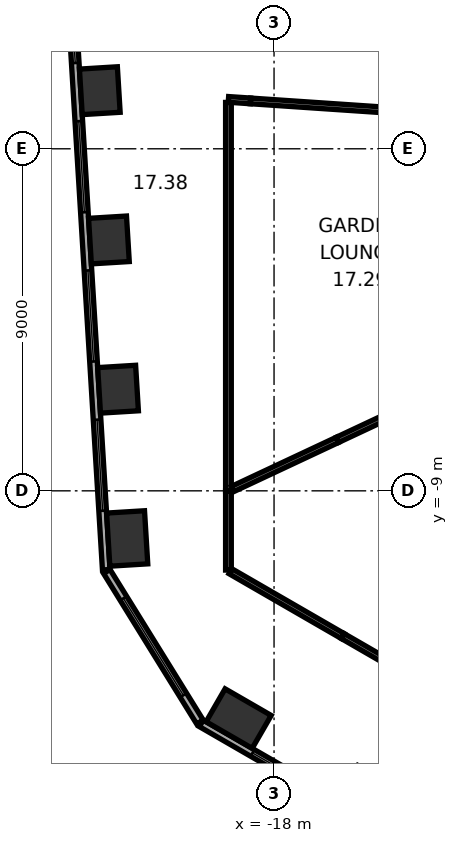
"""IFC4 building model, lengths in metres.
Left out: names, types, materials, properties, quantities, classifications, styles, units other than length and angle.
Written with IfcOpenShell. Run it as: python <this file> out.ifc"""

import sys

from ifc_helpers import new_model, si_unit, direction, frame, frame_2d, origin, origin_2d, place, context, subcontext, project, spatial, rectangle, extrude, element, fill, save


model = new_model("IFC4")
c1 = context("Model", 3, precision=1e-05, world=origin(), true_north=direction((0.0, 1.0)))
c2 = subcontext(c1, "Body", "Model", "MODEL_VIEW")
j1 = project(units=[si_unit("LENGTHUNIT", "METRE"), si_unit("PLANEANGLEUNIT", "RADIAN")], contexts=[c1])
p1 = place(None, origin())
s1 = spatial("IfcSite", under=j1, at=p1, CompositionType="ELEMENT")
p2 = place(p1, origin())
s2 = spatial("IfcBuilding", under=s1, at=p2, CompositionType="ELEMENT")
p3 = place(p2, frame((0.0, 0.0, 77.0)))
s3 = spatial("IfcBuildingStorey", under=s2, at=p3, CompositionType="ELEMENT", Elevation=77.0)
for number, where, z_axis, x_axis in (
    (1, (-22.585, 1.529, 0.0), (0.0, 0.0, 1.0), (0.061, -0.998, 0.0)),
    (2, (-22.345, -2.399, 0.0), (0.0, 0.0, 1.0), (0.061, -0.998, 0.0)),
    (3, (-22.105, -6.326, 0.0), (0.0, 0.0, 1.0), (0.061, -0.998, 0.0)),
):
    element("IfcColumn", number, at=place(p3, frame(where, z_axis=z_axis, x_axis=x_axis)), inside=s3, PredefinedType="COLUMN", context=c2, shape_type="SweptSolid", body=[
        extrude(rectangle(XDim=1.2, YDim=1.0, at=origin_2d()), origin(), (0.0, 0.0, 1.0), 6.6),
    ])
for number, where, z_axis, x_axis in (
    (4, (-21.865, -10.253, 0.0), (0.0, 0.0, 1.0), (0.061, -0.998, 0.0)),
    (5, (-18.932, -14.993, 0.0), (0.0, 0.0, 1.0), (0.866, -0.5, 0.0)),
):
    element("IfcColumn", number, at=place(p3, frame(where, z_axis=z_axis, x_axis=x_axis)), inside=s3, PredefinedType="COLUMN", context=c2, shape_type="SweptSolid", body=[
        extrude(rectangle(XDim=1.4, YDim=1.0, at=origin_2d()), origin(), (0.0, 0.0, 1.0), 6.6),
    ])
p4 = place(p3, frame((-23.713, 10.131, 0.0), z_axis=(0.0, 0.0, 1.0), x_axis=(0.061040439785, -0.998135293791, 0.0)))
e6 = element("IfcWall", 6, at=p4, inside=s3, PredefinedType="STANDARD", context=c2, shape_type="SweptSolid", body=[
    extrude(rectangle(XDim=21.246, YDim=0.2, at=frame_2d((10.623, 0.0))), origin(), (0.0, 0.0, 1.0), 6.6),
])
p5 = place(p4, frame((1.553, 0.0, 0.8)))
e7 = element("IfcOpeningElement", 7, at=p5, cuts=e6, PredefinedType="OPENING", context=c2, shape_type="SweptSolid", body=[
    extrude(rectangle(XDim=2.4, YDim=4.2, at=frame_2d((1.2, 2.1))), frame((0.0, 0.11, 0.0), z_axis=(0.0, -1.0, 0.0), x_axis=(1.0, 0.0, 0.0)), (0.0, 0.0, 1.0), 0.22),
])
p6 = place(p4, frame((5.488, 0.0, 0.8)))
e8 = element("IfcOpeningElement", 8, at=p6, cuts=e6, PredefinedType="OPENING", context=c2, shape_type="SweptSolid", body=[
    extrude(rectangle(XDim=2.4, YDim=4.2, at=frame_2d((1.2, 2.1))), frame((0.0, 0.11, 0.0), z_axis=(0.0, -1.0, 0.0), x_axis=(1.0, 0.0, 0.0)), (0.0, 0.0, 1.0), 0.22),
])
p7 = place(p4, frame((9.422, 0.0, 0.8)))
e9 = element("IfcOpeningElement", 9, at=p7, cuts=e6, PredefinedType="OPENING", context=c2, shape_type="SweptSolid", body=[
    extrude(rectangle(XDim=2.4, YDim=4.2, at=frame_2d((1.2, 2.1))), frame((0.0, 0.11, 0.0), z_axis=(0.0, -1.0, 0.0), x_axis=(1.0, 0.0, 0.0)), (0.0, 0.0, 1.0), 0.22),
])
p8 = place(p4, frame((13.357, 0.0, 0.8)))
e10 = element("IfcOpeningElement", 10, at=p8, cuts=e6, PredefinedType="OPENING", context=c2, shape_type="SweptSolid", body=[
    extrude(rectangle(XDim=2.4, YDim=4.2, at=frame_2d((1.2, 2.1))), frame((0.0, 0.11, 0.0), z_axis=(0.0, -1.0, 0.0), x_axis=(1.0, 0.0, 0.0)), (0.0, 0.0, 1.0), 0.22),
])
p9 = place(p4, frame((17.292, 0.0, 0.8)))
e11 = element("IfcOpeningElement", 11, at=p9, cuts=e6, PredefinedType="OPENING", context=c2, shape_type="SweptSolid", body=[
    extrude(rectangle(XDim=2.4, YDim=4.2, at=frame_2d((1.2, 2.1))), frame((0.0, 0.11, 0.0), z_axis=(0.0, -1.0, 0.0), x_axis=(1.0, 0.0, 0.0)), (0.0, 0.0, 1.0), 0.22),
])
p10 = place(p3, frame((-22.401, -11.122, 0.0), z_axis=(0.0, 0.0, 1.0), x_axis=(0.526197679914, -0.850362276711, 0.0)))
e12 = element("IfcWall", 12, at=p10, inside=s3, PredefinedType="STANDARD", context=c2, shape_type="SweptSolid", body=[
    extrude(rectangle(XDim=4.66, YDim=0.2, at=frame_2d((2.33, 0.0))), origin(), (0.0, 0.0, 1.0), 6.6),
])
p11 = place(p10, frame((0.83, 0.0, 0.8)))
e13 = element("IfcOpeningElement", 13, at=p11, cuts=e12, PredefinedType="OPENING", context=c2, shape_type="SweptSolid", body=[
    extrude(rectangle(XDim=3.0, YDim=4.2, at=frame_2d((1.5, 2.1))), frame((0.0, 0.11, 0.0), z_axis=(0.0, -1.0, 0.0), x_axis=(1.0, 0.0, 0.0)), (0.0, 0.0, 1.0), 0.22),
])
p12 = place(p3, frame((-19.914, -15.119, 0.0), z_axis=(0.0, 0.0, 1.0), x_axis=(0.866025418898, -0.499999973822, 0.0)))
e14 = element("IfcWall", 14, at=p12, inside=s3, PredefinedType="STANDARD", context=c2, shape_type="SweptSolid", body=[
    extrude(rectangle(XDim=21.246, YDim=0.2, at=frame_2d((10.623, 0.0))), origin(), (0.0, 0.0, 1.0), 6.6),
])
p13 = place(p12, frame((1.555, 0.0, 0.8)))
e15 = element("IfcOpeningElement", 15, at=p13, cuts=e14, PredefinedType="OPENING", context=c2, shape_type="SweptSolid", body=[
    extrude(rectangle(XDim=2.4, YDim=4.2, at=frame_2d((1.2, 2.1))), frame((0.0, 0.11, 0.0), z_axis=(0.0, -1.0, 0.0), x_axis=(1.0, 0.0, 0.0)), (0.0, 0.0, 1.0), 0.22),
])
p14 = place(p12, frame((5.489, 0.0, 0.8)))
e16 = element("IfcOpeningElement", 16, at=p14, cuts=e14, PredefinedType="OPENING", context=c2, shape_type="SweptSolid", body=[
    extrude(rectangle(XDim=2.4, YDim=4.2, at=frame_2d((1.2, 2.1))), frame((0.0, 0.11, 0.0), z_axis=(0.0, -1.0, 0.0), x_axis=(1.0, 0.0, 0.0)), (0.0, 0.0, 1.0), 0.22),
])
p15 = place(p12, frame((9.424, 0.0, 0.8)))
e17 = element("IfcOpeningElement", 17, at=p15, cuts=e14, PredefinedType="OPENING", context=c2, shape_type="SweptSolid", body=[
    extrude(rectangle(XDim=2.4, YDim=4.2, at=frame_2d((1.2, 2.1))), frame((0.0, 0.11, 0.0), z_axis=(0.0, -1.0, 0.0), x_axis=(1.0, 0.0, 0.0)), (0.0, 0.0, 1.0), 0.22),
])
p16 = place(p12, frame((13.358, 0.0, 0.8)))
e18 = element("IfcOpeningElement", 18, at=p16, cuts=e14, PredefinedType="OPENING", context=c2, shape_type="SweptSolid", body=[
    extrude(rectangle(XDim=2.4, YDim=4.2, at=frame_2d((1.2, 2.1))), frame((0.0, 0.11, 0.0), z_axis=(0.0, -1.0, 0.0), x_axis=(1.0, 0.0, 0.0)), (0.0, 0.0, 1.0), 0.22),
])
p17 = place(p12, frame((17.293, 0.0, 0.8)))
e19 = element("IfcOpeningElement", 19, at=p17, cuts=e14, PredefinedType="OPENING", context=c2, shape_type="SweptSolid", body=[
    extrude(rectangle(XDim=2.4, YDim=4.2, at=frame_2d((1.2, 2.1))), frame((0.0, 0.11, 0.0), z_axis=(0.0, -1.0, 0.0), x_axis=(1.0, 0.0, 0.0)), (0.0, 0.0, 1.0), 0.22),
])
p18 = place(p3, frame((-10.363, -16.187, 0.0), z_axis=(0.0, 0.0, 1.0), x_axis=(-0.866017637739, 0.500013450945, 0.0)))
e20 = element("IfcWall", 20, at=p18, inside=s3, PredefinedType="PARTITIONING", context=c2, shape_type="SweptSolid", body=[
    extrude(rectangle(XDim=6.73, YDim=0.15, at=frame_2d((3.365, 0.0))), origin(), (0.0, 0.0, 1.0), 6.35),
])
p19 = place(p3, frame((-16.191, -12.822, 0.0), z_axis=(0.0, 0.0, 1.0), x_axis=(-0.866003391805, 0.500038123928, 0.0)))
e21 = element("IfcWall", 21, at=p19, inside=s3, PredefinedType="PARTITIONING", context=c2, shape_type="SweptSolid", body=[
    extrude(rectangle(XDim=3.414, YDim=0.15, at=frame_2d((1.707, 0.0))), origin(), (0.0, 0.0, 1.0), 6.35),
])
p20 = place(p3, frame((-19.2, -11.085, 0.0), z_axis=(0.0, 0.0, 1.0), x_axis=(0.0, 1.0, 0.0)))
e22 = element("IfcWall", 22, at=p20, inside=s3, PredefinedType="PARTITIONING", context=c2, shape_type="SweptSolid", body=[
    extrude(rectangle(XDim=2.082, YDim=0.15, at=frame_2d((1.041, 0.0))), origin(), (0.0, 0.0, 1.0), 6.35),
])
p21 = place(p3, frame((-19.2, -9.003, 0.0), z_axis=(0.0, 0.0, 1.0), x_axis=(0.0, 1.0, 0.0)))
e23 = element("IfcWall", 23, at=p21, inside=s3, PredefinedType="PARTITIONING", context=c2, shape_type="SweptSolid", body=[
    extrude(rectangle(XDim=10.223, YDim=0.15, at=frame_2d((5.111, 0.0))), origin(), (0.0, 0.0, 1.0), 6.35),
])
p22 = place(p3, frame((-16.328, -7.657, 0.0), z_axis=(0.0, 0.0, 1.0), x_axis=(-0.905421466532, -0.424513801828, 0.0)))
e24 = element("IfcWall", 24, at=p22, inside=s3, PredefinedType="PARTITIONING", context=c2, shape_type="SweptSolid", body=[
    extrude(rectangle(XDim=3.052, YDim=0.15, at=frame_2d((1.526, 0.0))), origin(), (0.0, 0.0, 1.0), 6.35),
])
p23 = place(p3, frame((-16.328, -7.657, 0.0), z_axis=(0.0, 0.0, 1.0), x_axis=(0.905358810438, 0.424647411815, 0.0)))
e25 = element("IfcWall", 25, at=p23, inside=s3, PredefinedType="PARTITIONING", context=c2, shape_type="SweptSolid", body=[
    extrude(rectangle(XDim=2.783, YDim=0.15, at=frame_2d((1.391, 0.0))), origin(), (0.0, 0.0, 1.0), 6.35),
])
p24 = place(p3, frame((-18.621, 1.26, 0.0), z_axis=(0.0, 0.0, 1.0), x_axis=(0.99771599521, -0.067548448554, 0.0)))
e26 = element("IfcWall", 26, at=p24, inside=s3, PredefinedType="PARTITIONING", context=c2, shape_type="SweptSolid", body=[
    extrude(rectangle(XDim=4.612, YDim=0.15, at=frame_2d((2.306, 0.0))), origin(), (0.0, 0.0, 1.0), 5.9),
])
p25 = place(p3, frame((-18.621, 1.26, 0.0), z_axis=(0.0, 0.0, 1.0), x_axis=(-0.997677852721, 0.068109486785, 0.0)))
e27 = element("IfcWall", 27, at=p25, inside=s3, PredefinedType="PARTITIONING", context=c2, shape_type="SweptSolid", body=[
    extrude(rectangle(XDim=0.581, YDim=0.15, at=frame_2d((0.291, 0.0))), origin(), (0.0, 0.0, 1.0), 5.9),
])
p26 = place(p6, origin())
e28 = element("IfcWindow", 28, at=p26, inside=s3, PartitioningType="SINGLE_PANEL", PredefinedType="WINDOW", context=c2, shape_type="SweptSolid", body=[
    extrude(rectangle(XDim=2.4, YDim=4.2, at=frame_2d((1.2, 2.1))), frame((0.0, 0.03, 0.0), z_axis=(0.0, -1.0, 0.0), x_axis=(1.0, 0.0, 0.0)), (0.0, 0.0, 1.0), 0.06),
])
fill(e8, e28)
p27 = place(p7, origin())
e29 = element("IfcWindow", 29, at=p27, inside=s3, PartitioningType="SINGLE_PANEL", PredefinedType="WINDOW", context=c2, shape_type="SweptSolid", body=[
    extrude(rectangle(XDim=2.4, YDim=4.2, at=frame_2d((1.2, 2.1))), frame((0.0, 0.03, 0.0), z_axis=(0.0, -1.0, 0.0), x_axis=(1.0, 0.0, 0.0)), (0.0, 0.0, 1.0), 0.06),
])
fill(e9, e29)
p28 = place(p8, origin())
e30 = element("IfcWindow", 30, at=p28, inside=s3, PartitioningType="SINGLE_PANEL", PredefinedType="WINDOW", context=c2, shape_type="SweptSolid", body=[
    extrude(rectangle(XDim=2.4, YDim=4.2, at=frame_2d((1.2, 2.1))), frame((0.0, 0.03, 0.0), z_axis=(0.0, -1.0, 0.0), x_axis=(1.0, 0.0, 0.0)), (0.0, 0.0, 1.0), 0.06),
])
fill(e10, e30)
p29 = place(p9, origin())
e31 = element("IfcWindow", 31, at=p29, inside=s3, PartitioningType="SINGLE_PANEL", PredefinedType="WINDOW", context=c2, shape_type="SweptSolid", body=[
    extrude(rectangle(XDim=2.4, YDim=4.2, at=frame_2d((1.2, 2.1))), frame((0.0, 0.03, 0.0), z_axis=(0.0, -1.0, 0.0), x_axis=(1.0, 0.0, 0.0)), (0.0, 0.0, 1.0), 0.06),
])
fill(e11, e31)
p30 = place(p11, origin())
e32 = element("IfcWindow", 32, at=p30, inside=s3, PartitioningType="SINGLE_PANEL", PredefinedType="WINDOW", context=c2, shape_type="SweptSolid", body=[
    extrude(rectangle(XDim=3.0, YDim=4.2, at=frame_2d((1.5, 2.1))), frame((0.0, 0.03, 0.0), z_axis=(0.0, -1.0, 0.0), x_axis=(1.0, 0.0, 0.0)), (0.0, 0.0, 1.0), 0.06),
])
fill(e13, e32)
p31 = place(p13, origin())
e33 = element("IfcWindow", 33, at=p31, inside=s3, PartitioningType="SINGLE_PANEL", PredefinedType="WINDOW", context=c2, shape_type="SweptSolid", body=[
    extrude(rectangle(XDim=2.4, YDim=4.2, at=frame_2d((1.2, 2.1))), frame((0.0, 0.03, 0.0), z_axis=(0.0, -1.0, 0.0), x_axis=(1.0, 0.0, 0.0)), (0.0, 0.0, 1.0), 0.06),
])
fill(e15, e33)
save(model, sys.argv[1])
